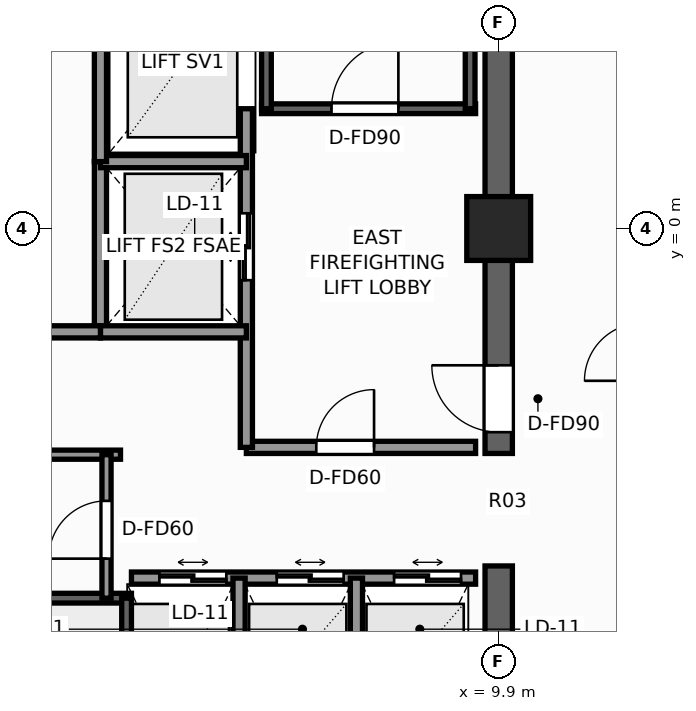
"""IFC4 building model, lengths in metres.
Left out: names, types, materials, properties, quantities, classifications, styles, units other than length and angle.
Written with IfcOpenShell. Run it as: python <this file> out.ifc"""

import sys

from ifc_helpers import new_model, si_unit, direction, frame, frame_2d, origin, origin_2d, place, context, subcontext, project, spatial, rectangle, extrude, element, fill, save


model = new_model("IFC4")
c1 = context("Model", 3, precision=1e-05, world=origin(), true_north=direction((0.0, 1.0)))
c2 = subcontext(c1, "Body", "Model", "MODEL_VIEW")
j1 = project(units=[si_unit("LENGTHUNIT", "METRE"), si_unit("PLANEANGLEUNIT", "RADIAN")], contexts=[c1])
p1 = place(None, origin())
s1 = spatial("IfcSite", under=j1, at=p1, CompositionType="ELEMENT")
p2 = place(p1, origin())
s2 = spatial("IfcBuilding", under=s1, at=p2, CompositionType="ELEMENT")
p3 = place(p2, frame((0.0, 0.0, 226.2)))
s3 = spatial("IfcBuildingStorey", under=s2, at=p3, CompositionType="ELEMENT", Elevation=226.2)
p4 = place(p3, frame((9.9, -9.675, 0.0), z_axis=(0.0, 0.0, 1.0), x_axis=(0.0, 1.0, 0.0)))
e1 = element("IfcWall", 1, at=p4, inside=s3, PredefinedType="SHEAR", context=c2, shape_type="SweptSolid", body=[
    extrude(rectangle(XDim=4.125, YDim=0.45, at=frame_2d((2.062, 0.0))), origin(), (0.0, 0.0, 1.0), 3.3),
])
p5 = place(p3, frame((9.9, -3.7, 0.0), z_axis=(0.0, 0.0, 1.0), x_axis=(0.0, 1.0, 0.0)))
e2 = element("IfcWall", 2, at=p5, inside=s3, PredefinedType="SHEAR", context=c2, shape_type="SweptSolid", body=[
    extrude(rectangle(XDim=13.375, YDim=0.45, at=frame_2d((6.688, 0.0))), origin(), (0.0, 0.0, 1.0), 3.3),
])
p6 = place(p5, frame((0.35, 0.0, 0.0)))
e3 = element("IfcOpeningElement", 3, at=p6, cuts=e2, PredefinedType="OPENING", context=c2, shape_type="SweptSolid", body=[
    extrude(rectangle(XDim=1.1, YDim=2.2, at=frame_2d((0.55, 1.1))), frame((0.0, 0.235, 0.0), z_axis=(0.0, -1.0, 0.0), x_axis=(1.0, 0.0, 0.0)), (0.0, 0.0, 1.0), 0.47),
])
p7 = place(p3, frame((9.9, 0.0, 0.0), z_axis=(0.0, 0.0, 1.0), x_axis=(1.0, 0.0, 0.0)))
e4 = element("IfcColumn", 4, at=p7, inside=s3, PredefinedType="COLUMN", context=c2, shape_type="SweptSolid", body=[
    extrude(rectangle(XDim=1.05, YDim=1.05, at=origin_2d()), origin(), (0.0, 0.0, 1.0), 3.3),
])
p8 = place(p3, frame((6.0, 1.97, 0.0), z_axis=(0.0, 0.0, 1.0), x_axis=(1.0, 0.0, 0.0)))
e5 = element("IfcWall", 5, at=p8, inside=s3, PredefinedType="SHEAR", context=c2, shape_type="SweptSolid", body=[
    extrude(rectangle(XDim=3.52, YDim=0.16, at=frame_2d((1.76, 0.0))), origin(), (0.0, 0.0, 1.0), 3.3),
])
p9 = place(p8, frame((1.15, 0.0, 0.0)))
e6 = element("IfcOpeningElement", 6, at=p9, cuts=e5, PredefinedType="OPENING", context=c2, shape_type="SweptSolid", body=[
    extrude(rectangle(XDim=1.1, YDim=2.2, at=frame_2d((0.55, 1.1))), frame((0.0, 0.09, 0.0), z_axis=(0.0, -1.0, 0.0), x_axis=(1.0, 0.0, 0.0)), (0.0, 0.0, 1.0), 0.18),
])
for number, where, z_axis, x_axis in (
    (7, (6.08, 1.97, 0.0), (0.0, 0.0, 1.0), (0.0, 1.0, 0.0)),
    (8, (9.43, 1.97, 0.0), (0.0, 0.0, 1.0), (0.0, 1.0, 0.0)),
):
    element("IfcWall", number, at=place(p3, frame(where, z_axis=z_axis, x_axis=x_axis)), inside=s3, PredefinedType="SHEAR", context=c2, shape_type="SweptSolid", body=[
        extrude(rectangle(XDim=7.56, YDim=0.16, at=frame_2d((3.78, 0.0))), origin(), (0.0, 0.0, 1.0), 3.3),
    ])
p10 = place(p3, frame((-3.86, -6.08, 0.0), z_axis=(0.0, 0.0, 1.0), x_axis=(1.0, 0.0, 0.0)))
e9 = element("IfcWall", 9, at=p10, inside=s3, PredefinedType="SHEAR", context=c2, shape_type="SweptSolid", body=[
    extrude(rectangle(XDim=7.72, YDim=0.16, at=frame_2d((3.86, 0.0))), origin(), (0.0, 0.0, 1.0), 3.3),
])
p11 = place(p3, frame((3.78, -9.43, 0.0), z_axis=(0.0, 0.0, 1.0), x_axis=(0.0, 1.0, 0.0)))
e10 = element("IfcWall", 10, at=p11, inside=s3, PredefinedType="SHEAR", context=c2, shape_type="SweptSolid", body=[
    extrude(rectangle(XDim=3.35, YDim=0.16, at=frame_2d((1.675, 0.0))), origin(), (0.0, 0.0, 1.0), 3.3),
])
p12 = place(p3, frame((5.75, -3.6, 0.0), z_axis=(0.0, 0.0, 1.0), x_axis=(1.0, 0.0, 0.0)))
e11 = element("IfcWall", 11, at=p12, inside=s3, PredefinedType="SOLIDWALL", context=c2, shape_type="SweptSolid", body=[
    extrude(rectangle(XDim=3.77, YDim=0.2, at=frame_2d((1.885, 0.0))), origin(), (0.0, 0.0, 1.0), 3.08),
])
p13 = place(p12, frame((1.15, 0.0, 0.0)))
e12 = element("IfcOpeningElement", 12, at=p13, cuts=e11, PredefinedType="OPENING", context=c2, shape_type="SweptSolid", body=[
    extrude(rectangle(XDim=0.95, YDim=2.06, at=frame_2d((0.475, 1.03))), frame((0.0, 0.11, 0.0), z_axis=(0.0, -1.0, 0.0), x_axis=(1.0, 0.0, 0.0)), (0.0, 0.0, 1.0), 0.22),
])
p14 = place(p3, frame((5.75, -3.6, 0.0), z_axis=(0.0, 0.0, 1.0), x_axis=(0.0, 1.0, 0.0)))
e13 = element("IfcWall", 13, at=p14, inside=s3, PredefinedType="SOLIDWALL", context=c2, shape_type="SweptSolid", body=[
    extrude(rectangle(XDim=5.57, YDim=0.2, at=frame_2d((2.785, 0.0))), origin(), (0.0, 0.0, 1.0), 3.08),
])
p15 = place(p14, frame((2.75, 0.0, 0.0)))
e14 = element("IfcOpeningElement", 14, at=p15, cuts=e13, PredefinedType="OPENING", context=c2, shape_type="SweptSolid", body=[
    extrude(rectangle(XDim=1.1, YDim=2.2, at=frame_2d((0.55, 1.1))), frame((0.0, 0.11, 0.0), z_axis=(0.0, -1.0, 0.0), x_axis=(1.0, 0.0, 0.0)), (0.0, 0.0, 1.0), 0.22),
])
p16 = place(p3, frame((3.35, -1.7, 0.0), z_axis=(0.0, 0.0, 1.0), x_axis=(0.0, 1.0, 0.0)))
e15 = element("IfcWall", 15, at=p16, inside=s3, PredefinedType="SOLIDWALL", context=c2, shape_type="SweptSolid", body=[
    extrude(rectangle(XDim=2.8, YDim=0.2, at=frame_2d((1.4, 0.0))), origin(), (0.0, 0.0, 1.0), 3.08),
])
for number, where, z_axis, x_axis in (
    (16, (3.35, -1.7, 0.0), (0.0, 0.0, 1.0), (1.0, 0.0, 0.0)),
    (17, (3.35, 1.1, 0.0), (0.0, 0.0, 1.0), (1.0, 0.0, 0.0)),
):
    element("IfcWall", number, at=place(p3, frame(where, z_axis=z_axis, x_axis=x_axis)), inside=s3, PredefinedType="SOLIDWALL", context=c2, shape_type="SweptSolid", body=[
        extrude(rectangle(XDim=2.4, YDim=0.2, at=frame_2d((1.2, 0.0))), origin(), (0.0, 0.0, 1.0), 3.08),
    ])
p17 = place(p3, frame((3.86, -5.75, 0.0), z_axis=(0.0, 0.0, 1.0), x_axis=(1.0, 0.0, 0.0)))
e18 = element("IfcWall", 18, at=p17, inside=s3, PredefinedType="SOLIDWALL", context=c2, shape_type="SweptSolid", body=[
    extrude(rectangle(XDim=5.66, YDim=0.2, at=frame_2d((2.83, 0.0))), origin(), (0.0, 0.0, 1.0), 3.08),
])
p18 = place(p17, frame((0.46, 0.0, 0.0)))
e19 = element("IfcOpeningElement", 19, at=p18, cuts=e18, PredefinedType="OPENING", context=c2, shape_type="SweptSolid", body=[
    extrude(rectangle(XDim=1.1, YDim=2.2, at=frame_2d((0.55, 1.1))), frame((0.0, 0.11, 0.0), z_axis=(0.0, -1.0, 0.0), x_axis=(1.0, 0.0, 0.0)), (0.0, 0.0, 1.0), 0.22),
])
p19 = place(p17, frame((2.39, 0.0, 0.0)))
e20 = element("IfcOpeningElement", 20, at=p19, cuts=e18, PredefinedType="OPENING", context=c2, shape_type="SweptSolid", body=[
    extrude(rectangle(XDim=1.1, YDim=2.2, at=frame_2d((0.55, 1.1))), frame((0.0, 0.11, 0.0), z_axis=(0.0, -1.0, 0.0), x_axis=(1.0, 0.0, 0.0)), (0.0, 0.0, 1.0), 0.22),
])
p20 = place(p17, frame((4.32, 0.0, 0.0)))
e21 = element("IfcOpeningElement", 21, at=p20, cuts=e18, PredefinedType="OPENING", context=c2, shape_type="SweptSolid", body=[
    extrude(rectangle(XDim=1.1, YDim=2.2, at=frame_2d((0.55, 1.1))), frame((0.0, 0.11, 0.0), z_axis=(0.0, -1.0, 0.0), x_axis=(1.0, 0.0, 0.0)), (0.0, 0.0, 1.0), 0.22),
])
for number, where, z_axis, x_axis in (
    (22, (5.63, -9.52, 0.0), (0.0, 0.0, 1.0), (0.0, 1.0, 0.0)),
    (23, (7.56, -9.52, 0.0), (0.0, 0.0, 1.0), (0.0, 1.0, 0.0)),
):
    element("IfcWall", number, at=place(p3, frame(where, z_axis=z_axis, x_axis=x_axis)), inside=s3, PredefinedType="SOLIDWALL", context=c2, shape_type="SweptSolid", body=[
        extrude(rectangle(XDim=3.77, YDim=0.2, at=frame_2d((1.885, 0.0))), origin(), (0.0, 0.0, 1.0), 3.08),
    ])
p21 = place(p3, frame((-3.35, -1.7, 0.0), z_axis=(0.0, 0.0, 1.0), x_axis=(1.0, 0.0, 0.0)))
e24 = element("IfcWall", 24, at=p21, inside=s3, PredefinedType="SOLIDWALL", context=c2, shape_type="SweptSolid", body=[
    extrude(rectangle(XDim=6.7, YDim=0.2, at=frame_2d((3.35, 0.0))), origin(), (0.0, 0.0, 1.0), 3.08),
])
p22 = place(p3, frame((3.35, 1.1, 0.0), z_axis=(0.0, 0.0, 1.0), x_axis=(0.0, 1.0, 0.0)))
e25 = element("IfcWall", 25, at=p22, inside=s3, PredefinedType="SOLIDWALL", context=c2, shape_type="SweptSolid", body=[
    extrude(rectangle(XDim=3.2, YDim=0.2, at=frame_2d((1.6, 0.0))), origin(), (0.0, 0.0, 1.0), 3.08),
])
p23 = place(p3, frame((-3.68, -3.72, 0.0), z_axis=(0.0, 0.0, 1.0), x_axis=(1.0, 0.0, 0.0)))
e26 = element("IfcWall", 26, at=p23, inside=s3, PredefinedType="PARTITIONING", context=c2, shape_type="SweptSolid", body=[
    extrude(rectangle(XDim=7.36, YDim=0.15, at=frame_2d((3.68, 0.0))), origin(), (0.0, 0.0, 1.0), 3.08),
])
p24 = place(p3, frame((3.45, -6.08, 0.0), z_axis=(0.0, 0.0, 1.0), x_axis=(0.0, 1.0, 0.0)))
e27 = element("IfcWall", 27, at=p24, inside=s3, PredefinedType="PARTITIONING", context=c2, shape_type="SweptSolid", body=[
    extrude(rectangle(XDim=2.36, YDim=0.15, at=frame_2d((1.18, 0.0))), origin(), (0.0, 0.0, 1.0), 3.08),
])
p25 = place(p24, frame((0.65, 0.0, 0.0)))
e28 = element("IfcOpeningElement", 28, at=p25, cuts=e27, PredefinedType="OPENING", context=c2, shape_type="SweptSolid", body=[
    extrude(rectangle(XDim=0.95, YDim=2.06, at=frame_2d((0.475, 1.03))), frame((0.0, 0.085, 0.0), z_axis=(0.0, -1.0, 0.0), x_axis=(1.0, 0.0, 0.0)), (0.0, 0.0, 1.0), 0.17),
])
p26 = place(p9, origin())
e29 = element("IfcDoor", 29, at=p26, inside=s3, OperationType="SINGLE_SWING_RIGHT", PredefinedType="DOOR", context=c2, shape_type="SweptSolid", body=[
    extrude(rectangle(XDim=1.1, YDim=2.2, at=frame_2d((0.55, 1.1))), frame((0.0, 0.025, 0.0), z_axis=(0.0, -1.0, 0.0), x_axis=(1.0, 0.0, 0.0)), (0.0, 0.0, 1.0), 0.05),
])
fill(e6, e29)
p27 = place(p6, origin())
e30 = element("IfcDoor", 30, at=p27, inside=s3, OperationType="SINGLE_SWING_RIGHT", PredefinedType="DOOR", context=c2, shape_type="SweptSolid", body=[
    extrude(rectangle(XDim=1.1, YDim=2.2, at=frame_2d((0.55, 1.1))), frame((0.0, 0.025, 0.0), z_axis=(0.0, -1.0, 0.0), x_axis=(1.0, 0.0, 0.0)), (0.0, 0.0, 1.0), 0.05),
])
fill(e3, e30)
p28 = place(p15, origin())
e31 = element("IfcDoor", 31, at=p28, inside=s3, OperationType="DOUBLE_DOOR_SLIDING", PredefinedType="DOOR", context=c2, shape_type="SweptSolid", body=[
    extrude(rectangle(XDim=1.1, YDim=2.2, at=frame_2d((0.55, 1.1))), frame((0.0, 0.025, 0.0), z_axis=(0.0, -1.0, 0.0), x_axis=(1.0, 0.0, 0.0)), (0.0, 0.0, 1.0), 0.05),
])
fill(e14, e31)
p29 = place(p18, origin())
e32 = element("IfcDoor", 32, at=p29, inside=s3, OperationType="DOUBLE_DOOR_SLIDING", PredefinedType="DOOR", context=c2, shape_type="SweptSolid", body=[
    extrude(rectangle(XDim=1.1, YDim=2.2, at=frame_2d((0.55, 1.1))), frame((0.0, 0.025, 0.0), z_axis=(0.0, -1.0, 0.0), x_axis=(1.0, 0.0, 0.0)), (0.0, 0.0, 1.0), 0.05),
])
fill(e19, e32)
p30 = place(p19, origin())
e33 = element("IfcDoor", 33, at=p30, inside=s3, OperationType="DOUBLE_DOOR_SLIDING", PredefinedType="DOOR", context=c2, shape_type="SweptSolid", body=[
    extrude(rectangle(XDim=1.1, YDim=2.2, at=frame_2d((0.55, 1.1))), frame((0.0, 0.025, 0.0), z_axis=(0.0, -1.0, 0.0), x_axis=(1.0, 0.0, 0.0)), (0.0, 0.0, 1.0), 0.05),
])
fill(e20, e33)
p31 = place(p20, origin())
e34 = element("IfcDoor", 34, at=p31, inside=s3, OperationType="DOUBLE_DOOR_SLIDING", PredefinedType="DOOR", context=c2, shape_type="SweptSolid", body=[
    extrude(rectangle(XDim=1.1, YDim=2.2, at=frame_2d((0.55, 1.1))), frame((0.0, 0.025, 0.0), z_axis=(0.0, -1.0, 0.0), x_axis=(1.0, 0.0, 0.0)), (0.0, 0.0, 1.0), 0.05),
])
fill(e21, e34)
p32 = place(p13, origin())
e35 = element("IfcDoor", 35, at=p32, inside=s3, OperationType="SINGLE_SWING_RIGHT", PredefinedType="DOOR", context=c2, shape_type="SweptSolid", body=[
    extrude(rectangle(XDim=0.95, YDim=2.06, at=frame_2d((0.475, 1.03))), frame((0.0, 0.025, 0.0), z_axis=(0.0, -1.0, 0.0), x_axis=(1.0, 0.0, 0.0)), (0.0, 0.0, 1.0), 0.05),
])
fill(e12, e35)
p33 = place(p25, origin())
e36 = element("IfcDoor", 36, at=p33, inside=s3, OperationType="SINGLE_SWING_LEFT", PredefinedType="DOOR", context=c2, shape_type="SweptSolid", body=[
    extrude(rectangle(XDim=0.95, YDim=2.06, at=frame_2d((0.475, 1.03))), frame((0.0, 0.025, 0.0), z_axis=(0.0, -1.0, 0.0), x_axis=(1.0, 0.0, 0.0)), (0.0, 0.0, 1.0), 0.05),
])
fill(e28, e36)
save(model, sys.argv[1])
